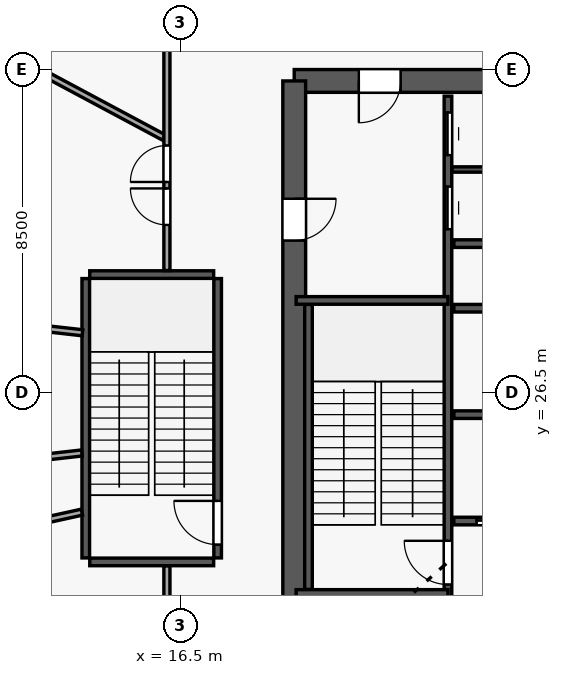
"""IFC4 building model, lengths in metres.
Left out: names, types, materials, properties, quantities, classifications, styles, units other than length and angle.
Written with IfcOpenShell. Run it as: python <this file> out.ifc"""

import sys

from ifc_helpers import new_model, si_unit, direction, frame, frame_2d, origin, origin_with_axes, origin_2d, place, context, subcontext, project, spatial, rectangle, circle, extrude, source, transform, mapped, element, fill, save


model = new_model("IFC4")
c1 = context("Model", 3, precision=1e-05, world=origin(), true_north=direction((0.0, 1.0)))
c2 = subcontext(c1, "Body", "Model", "MODEL_VIEW")
j1 = project(units=[si_unit("LENGTHUNIT", "METRE"), si_unit("PLANEANGLEUNIT", "RADIAN")], contexts=[c1])
p1 = place(None, origin())
s1 = spatial("IfcSite", under=j1, at=p1, CompositionType="ELEMENT")
p2 = place(p1, origin())
s2 = spatial("IfcBuilding", under=s1, at=p2, CompositionType="ELEMENT")
p3 = place(p2, frame((0.0, 0.0, 9.0)))
s3 = spatial("IfcBuildingStorey", under=s2, at=p3, CompositionType="ELEMENT", Elevation=9.0)
p4 = place(p3, frame((26.55, 34.7, 0.0), z_axis=(0.0, 0.0, 1.0), x_axis=(-1.0, 0.0, 0.0)))
e1 = element("IfcWall", 1, at=p4, inside=s3, PredefinedType="SHEAR", context=c2, shape_type="SweptSolid", body=[
    extrude(rectangle(XDim=7.05, YDim=0.6, at=frame_2d((3.525, 0.0))), origin(), (0.0, 0.0, 1.0), 4.2),
])
p5 = place(p4, frame((4.25, 0.0, 0.0)))
e2 = element("IfcOpeningElement", 2, at=p5, cuts=e1, PredefinedType="OPENING", context=c2, shape_type="SweptSolid", body=[
    extrude(rectangle(XDim=1.1, YDim=2.15, at=frame_2d((0.55, 1.075))), frame((0.0, 0.31, 0.0), z_axis=(0.0, -1.0, 0.0), x_axis=(1.0, 0.0, 0.0)), (0.0, 0.0, 1.0), 0.62),
])
p6 = place(p3, frame((19.5, 34.7, 0.0), z_axis=(0.0, 0.0, 1.0), x_axis=(0.0, -1.0, 0.0)))
e3 = element("IfcWall", 3, at=p6, inside=s3, PredefinedType="SHEAR", context=c2, shape_type="SweptSolid", body=[
    extrude(rectangle(XDim=16.4, YDim=0.6, at=frame_2d((8.2, 0.0))), origin(), (0.0, 0.0, 1.0), 4.2),
])
p7 = place(p6, frame((3.1, 0.0, 0.0)))
e4 = element("IfcOpeningElement", 4, at=p7, cuts=e3, PredefinedType="OPENING", context=c2, shape_type="SweptSolid", body=[
    extrude(rectangle(XDim=1.1, YDim=2.15, at=frame_2d((0.55, 1.075))), frame((0.0, 0.31, 0.0), z_axis=(0.0, -1.0, 0.0), x_axis=(1.0, 0.0, 0.0)), (0.0, 0.0, 1.0), 0.62),
])
m1 = source(origin_with_axes(), c2, "Body", "SweptSolid", [
    extrude(circle(Radius=0.9, at=origin_2d()), origin(), (0.0, 0.0, 1.0), 4.5),
])
p8 = place(p3, frame((19.5, 34.7, 0.0), z_axis=(0.0, 0.0, 1.0), x_axis=(1.0, 0.0, 0.0)))
e5 = element("IfcColumn", 5, at=p8, inside=s3, PredefinedType="COLUMN", context=c2, shape_type="MappedRepresentation", body=[
    mapped(m1, transform((0.0, 0.0, 0.0), scale=1.0)),
])
m2 = source(origin_with_axes(), c2, "Body", "SweptSolid", [
    extrude(rectangle(XDim=1.2, YDim=1.2, at=origin_2d()), origin(), (0.0, 0.0, 1.0), 4.5),
])
p9 = place(p3, frame((23.55, 29.0, 0.0), z_axis=(0.0, 0.0, 1.0), x_axis=(1.0, 0.0, 0.0)))
e6 = element("IfcColumn", 6, at=p9, inside=s3, PredefinedType="COLUMN", context=c2, shape_type="MappedRepresentation", body=[
    mapped(m2, transform((0.0, 0.0, 0.0), scale=1.0)),
])
p10 = place(p3, frame((23.545, 18.7, 0.0), z_axis=(0.0, 0.0, 1.0), x_axis=(0.0, 1.0, 0.0)))
e7 = element("IfcWall", 7, at=p10, inside=s3, PredefinedType="SHEAR", context=c2, shape_type="SweptSolid", body=[
    extrude(rectangle(XDim=15.6, YDim=0.2, at=frame_2d((7.8, 0.0))), origin(), (0.0, 0.0, 1.0), 4.2),
])
p11 = place(p10, frame((2.75, 0.0, 0.0)))
e8 = element("IfcOpeningElement", 8, at=p11, cuts=e7, PredefinedType="OPENING", context=c2, shape_type="SweptSolid", body=[
    extrude(rectangle(XDim=1.15, YDim=2.15, at=frame_2d((0.575, 1.075))), frame((0.0, 0.11, 0.0), z_axis=(0.0, -1.0, 0.0), x_axis=(1.0, 0.0, 0.0)), (0.0, 0.0, 1.0), 0.22),
])
p12 = place(p10, frame((0.14, 0.0, 0.0)))
e9 = element("IfcOpeningElement", 9, at=p12, cuts=e7, PredefinedType="OPENING", context=c2, shape_type="SweptSolid", body=[
    extrude(rectangle(XDim=0.88, YDim=2.1, at=frame_2d((0.44, 1.05))), frame((0.0, 0.11, 0.0), z_axis=(0.0, -1.0, 0.0), x_axis=(1.0, 0.0, 0.0)), (0.0, 0.0, 1.0), 0.22),
])
p13 = place(p10, frame((1.36, 0.0, 0.0)))
e10 = element("IfcOpeningElement", 10, at=p13, cuts=e7, PredefinedType="OPENING", context=c2, shape_type="SweptSolid", body=[
    extrude(rectangle(XDim=0.88, YDim=2.1, at=frame_2d((0.44, 1.05))), frame((0.0, 0.11, 0.0), z_axis=(0.0, -1.0, 0.0), x_axis=(1.0, 0.0, 0.0)), (0.0, 0.0, 1.0), 0.22),
])
p14 = place(p10, frame((12.1, 0.0, 0.0)))
e11 = element("IfcOpeningElement", 11, at=p14, cuts=e7, PredefinedType="OPENING", context=c2, shape_type="SweptSolid", body=[
    extrude(rectangle(XDim=1.12, YDim=2.15, at=frame_2d((0.56, 1.075))), frame((0.0, 0.11, 0.0), z_axis=(0.0, -1.0, 0.0), x_axis=(1.0, 0.0, 0.0)), (0.0, 0.0, 1.0), 0.22),
])
p15 = place(p10, frame((14.05, 0.0, 0.0)))
e12 = element("IfcOpeningElement", 12, at=p15, cuts=e7, PredefinedType="OPENING", context=c2, shape_type="SweptSolid", body=[
    extrude(rectangle(XDim=1.12, YDim=2.15, at=frame_2d((0.56, 1.075))), frame((0.0, 0.11, 0.0), z_axis=(0.0, -1.0, 0.0), x_axis=(1.0, 0.0, 0.0)), (0.0, 0.0, 1.0), 0.22),
])
p16 = place(p3, frame((23.7, 23.12, 0.0), z_axis=(0.0, 0.0, 1.0), x_axis=(1.0, 0.0, 0.0)))
e13 = element("IfcWall", 13, at=p16, inside=s3, PredefinedType="SHEAR", context=c2, shape_type="SweptSolid", body=[
    extrude(rectangle(XDim=9.6, YDim=0.2, at=frame_2d((4.8, 0.0))), origin(), (0.0, 0.0, 1.0), 4.2),
])
p17 = place(p16, frame((0.6, 0.0, 0.0)))
e14 = element("IfcOpeningElement", 14, at=p17, cuts=e13, PredefinedType="OPENING", context=c2, shape_type="SweptSolid", body=[
    extrude(rectangle(XDim=1.1, YDim=2.15, at=frame_2d((0.55, 1.075))), frame((0.0, 0.11, 0.0), z_axis=(0.0, -1.0, 0.0), x_axis=(1.0, 0.0, 0.0)), (0.0, 0.0, 1.0), 0.22),
])
p18 = place(p16, frame((2.98, 0.0, 0.0)))
e15 = element("IfcOpeningElement", 15, at=p18, cuts=e13, PredefinedType="OPENING", context=c2, shape_type="SweptSolid", body=[
    extrude(rectangle(XDim=1.1, YDim=2.15, at=frame_2d((0.55, 1.075))), frame((0.0, 0.11, 0.0), z_axis=(0.0, -1.0, 0.0), x_axis=(1.0, 0.0, 0.0)), (0.0, 0.0, 1.0), 0.22),
])
p19 = place(p16, frame((5.36, 0.0, 0.0)))
e16 = element("IfcOpeningElement", 16, at=p19, cuts=e13, PredefinedType="OPENING", context=c2, shape_type="SweptSolid", body=[
    extrude(rectangle(XDim=1.1, YDim=2.15, at=frame_2d((0.55, 1.075))), frame((0.0, 0.11, 0.0), z_axis=(0.0, -1.0, 0.0), x_axis=(1.0, 0.0, 0.0)), (0.0, 0.0, 1.0), 0.22),
])
p20 = place(p16, frame((7.74, 0.0, 0.0)))
e17 = element("IfcOpeningElement", 17, at=p20, cuts=e13, PredefinedType="OPENING", context=c2, shape_type="SweptSolid", body=[
    extrude(rectangle(XDim=1.1, YDim=2.15, at=frame_2d((0.55, 1.075))), frame((0.0, 0.11, 0.0), z_axis=(0.0, -1.0, 0.0), x_axis=(1.0, 0.0, 0.0)), (0.0, 0.0, 1.0), 0.22),
])
for number, where, z_axis, x_axis in (
    (18, (23.7, 25.92, 0.0), (0.0, 0.0, 1.0), (1.0, 0.0, 0.0)),
    (19, (23.7, 28.72, 0.0), (0.0, 0.0, 1.0), (1.0, 0.0, 0.0)),
):
    element("IfcWall", number, at=place(p3, frame(where, z_axis=z_axis, x_axis=x_axis)), inside=s3, PredefinedType="SHEAR", context=c2, shape_type="SweptSolid", body=[
        extrude(rectangle(XDim=9.6, YDim=0.2, at=frame_2d((4.8, 0.0))), origin(), (0.0, 0.0, 1.0), 4.2),
    ])
p21 = place(p3, frame((19.875, 21.32, 0.0), z_axis=(0.0, 0.0, 1.0), x_axis=(0.0, 1.0, 0.0)))
e20 = element("IfcWall", 20, at=p21, inside=s3, PredefinedType="SHEAR", context=c2, shape_type="SweptSolid", body=[
    extrude(rectangle(XDim=7.5, YDim=0.2, at=frame_2d((3.75, 0.0))), origin(), (0.0, 0.0, 1.0), 4.2),
])
p22 = place(p3, frame((14.015, 22.15, 0.0), z_axis=(0.0, 0.0, 1.0), x_axis=(0.0, 1.0, 0.0)))
e21 = element("IfcWall", 21, at=p22, inside=s3, PredefinedType="SHEAR", context=c2, shape_type="SweptSolid", body=[
    extrude(rectangle(XDim=7.35, YDim=0.2, at=frame_2d((3.675, 0.0))), origin(), (0.0, 0.0, 1.0), 4.2),
])
p23 = place(p3, frame((17.485, 22.15, 0.0), z_axis=(0.0, 0.0, 1.0), x_axis=(0.0, 1.0, 0.0)))
e22 = element("IfcWall", 22, at=p23, inside=s3, PredefinedType="SHEAR", context=c2, shape_type="SweptSolid", body=[
    extrude(rectangle(XDim=7.35, YDim=0.2, at=frame_2d((3.675, 0.0))), origin(), (0.0, 0.0, 1.0), 4.2),
])
p24 = place(p23, frame((0.35, 0.0, 0.0)))
e23 = element("IfcOpeningElement", 23, at=p24, cuts=e22, PredefinedType="OPENING", context=c2, shape_type="SweptSolid", body=[
    extrude(rectangle(XDim=1.15, YDim=2.15, at=frame_2d((0.575, 1.075))), frame((0.0, 0.11, 0.0), z_axis=(0.0, -1.0, 0.0), x_axis=(1.0, 0.0, 0.0)), (0.0, 0.0, 1.0), 0.22),
])
for number, where, z_axis, x_axis in (
    (24, (19.55, 21.215, 0.0), (0.0, 0.0, 1.0), (1.0, 0.0, 0.0)),
    (25, (19.55, 28.925, 0.0), (0.0, 0.0, 1.0), (1.0, 0.0, 0.0)),
):
    element("IfcWall", number, at=place(p3, frame(where, z_axis=z_axis, x_axis=x_axis)), inside=s3, PredefinedType="SHEAR", context=c2, shape_type="SweptSolid", body=[
        extrude(rectangle(XDim=3.995, YDim=0.2, at=frame_2d((1.998, 0.0))), origin(), (0.0, 0.0, 1.0), 4.2),
    ])
for number, where, z_axis, x_axis in (
    (26, (14.12, 22.045, 0.0), (0.0, 0.0, 1.0), (1.0, 0.0, 0.0)),
    (27, (14.12, 29.605, 0.0), (0.0, 0.0, 1.0), (1.0, 0.0, 0.0)),
):
    element("IfcWall", number, at=place(p3, frame(where, z_axis=z_axis, x_axis=x_axis)), inside=s3, PredefinedType="SHEAR", context=c2, shape_type="SweptSolid", body=[
        extrude(rectangle(XDim=3.26, YDim=0.2, at=frame_2d((1.63, 0.0))), origin(), (0.0, 0.0, 1.0), 4.2),
    ])
p25 = place(p3, frame((23.7, 30.42, 0.0), z_axis=(0.0, 0.0, 1.0), x_axis=(1.0, 0.0, 0.0)))
e28 = element("IfcWall", 28, at=p25, inside=s3, PredefinedType="SHEAR", context=c2, shape_type="SweptSolid", body=[
    extrude(rectangle(XDim=2.78, YDim=0.2, at=frame_2d((1.39, 0.0))), origin(), (0.0, 0.0, 1.0), 4.2),
])
p26 = place(p3, frame((16.068, 33.214, 0.0), z_axis=(0.0, 0.0, 1.0), x_axis=(-0.881886972295, 0.471460887132, 0.0)))
e29 = element("IfcWall", 29, at=p26, inside=s3, PredefinedType="PARTITIONING", context=c2, shape_type="SweptSolid", body=[
    extrude(rectangle(XDim=13.704, YDim=0.16, at=frame_2d((6.852, 0.0))), origin(), (0.0, 0.0, 1.0), 4.2),
])
p27 = place(p26, frame((6.422, 0.0, 0.0)))
e30 = element("IfcOpeningElement", 30, at=p27, cuts=e29, PredefinedType="OPENING", context=c2, shape_type="SweptSolid", body=[
    extrude(rectangle(XDim=0.86, YDim=2.04, at=frame_2d((0.43, 1.02))), frame((0.0, 0.09, 0.0), z_axis=(0.0, -1.0, 0.0), x_axis=(1.0, 0.0, 0.0)), (0.0, 0.0, 1.0), 0.18),
])
p28 = place(p3, frame((13.913, 23.354, 0.0), z_axis=(0.0, 0.0, 1.0), x_axis=(-0.976669637868, -0.214747336346, 0.0)))
e31 = element("IfcWall", 31, at=p28, inside=s3, PredefinedType="PARTITIONING", context=c2, shape_type="SweptSolid", body=[
    extrude(rectangle(XDim=10.174, YDim=0.16, at=frame_2d((5.087, 0.0))), origin(), (0.0, 0.0, 1.0), 4.2),
])
p29 = place(p28, frame((4.594, 0.0, 0.0)))
e32 = element("IfcOpeningElement", 32, at=p29, cuts=e31, PredefinedType="OPENING", context=c2, shape_type="SweptSolid", body=[
    extrude(rectangle(XDim=0.96, YDim=2.15, at=frame_2d((0.48, 1.075))), frame((0.0, 0.09, 0.0), z_axis=(0.0, -1.0, 0.0), x_axis=(1.0, 0.0, 0.0)), (0.0, 0.0, 1.0), 0.18),
])
p30 = place(p3, frame((13.913, 24.912, 0.0), z_axis=(0.0, 0.0, 1.0), x_axis=(-0.993672362641, -0.112317566405, 0.0)))
e33 = element("IfcWall", 33, at=p30, inside=s3, PredefinedType="PARTITIONING", context=c2, shape_type="SweptSolid", body=[
    extrude(rectangle(XDim=10.001, YDim=0.16, at=frame_2d((5.0, 0.0))), origin(), (0.0, 0.0, 1.0), 4.2),
])
p31 = place(p30, frame((4.66, 0.0, 0.0)))
e34 = element("IfcOpeningElement", 34, at=p31, cuts=e33, PredefinedType="OPENING", context=c2, shape_type="SweptSolid", body=[
    extrude(rectangle(XDim=0.86, YDim=2.04, at=frame_2d((0.43, 1.02))), frame((0.0, 0.09, 0.0), z_axis=(0.0, -1.0, 0.0), x_axis=(1.0, 0.0, 0.0)), (0.0, 0.0, 1.0), 0.18),
])
p32 = place(p3, frame((3.975, 29.191, 0.0), z_axis=(0.0, 0.0, 1.0), x_axis=(0.993764244895, -0.111501684152, 0.0)))
e35 = element("IfcWall", 35, at=p32, inside=s3, PredefinedType="PARTITIONING", context=c2, shape_type="SweptSolid", body=[
    extrude(rectangle(XDim=10.015, YDim=0.16, at=frame_2d((5.008, 0.0))), origin(), (0.0, 0.0, 1.0), 4.2),
])
p33 = place(p32, frame((4.367, 0.0, 0.0)))
e36 = element("IfcOpeningElement", 36, at=p33, cuts=e35, PredefinedType="OPENING", context=c2, shape_type="SweptSolid", body=[
    extrude(rectangle(XDim=0.96, YDim=2.15, at=frame_2d((0.48, 1.075))), frame((0.0, 0.09, 0.0), z_axis=(0.0, -1.0, 0.0), x_axis=(1.0, 0.0, 0.0)), (0.0, 0.0, 1.0), 0.18),
])
p34 = place(p3, frame((16.15, 29.712, 0.0), z_axis=(0.0, 0.0, 1.0), x_axis=(0.0, 1.0, 0.0)))
e37 = element("IfcWall", 37, at=p34, inside=s3, PredefinedType="PARTITIONING", context=c2, shape_type="SweptSolid", body=[
    extrude(rectangle(XDim=5.861, YDim=0.16, at=frame_2d((2.93, 0.0))), origin(), (0.0, 0.0, 1.0), 4.2),
])
p35 = place(p34, frame((2.33, 0.0, 0.0)))
e38 = element("IfcOpeningElement", 38, at=p35, cuts=e37, PredefinedType="OPENING", context=c2, shape_type="SweptSolid", body=[
    extrude(rectangle(XDim=0.96, YDim=2.15, at=frame_2d((0.48, 1.075))), frame((0.0, 0.09, 0.0), z_axis=(0.0, -1.0, 0.0), x_axis=(1.0, 0.0, 0.0)), (0.0, 0.0, 1.0), 0.18),
])
p36 = place(p34, frame((1.2, 0.0, 0.0)))
e39 = element("IfcOpeningElement", 39, at=p36, cuts=e37, PredefinedType="OPENING", context=c2, shape_type="SweptSolid", body=[
    extrude(rectangle(XDim=0.96, YDim=2.15, at=frame_2d((0.48, 1.075))), frame((0.0, 0.09, 0.0), z_axis=(0.0, -1.0, 0.0), x_axis=(1.0, 0.0, 0.0)), (0.0, 0.0, 1.0), 0.18),
])
p37 = place(p3, frame((23.652, 32.37, 0.0), z_axis=(0.0, 0.0, 1.0), x_axis=(1.0, 0.0, 0.0)))
e40 = element("IfcWall", 40, at=p37, inside=s3, PredefinedType="PARTITIONING", context=c2, shape_type="SweptSolid", body=[
    extrude(rectangle(XDim=2.828, YDim=0.14, at=frame_2d((1.414, 0.0))), origin(), (0.0, 0.0, 1.0), 4.2),
])
p38 = place(p3, frame((16.15, 20.42, 0.0), z_axis=(0.0, 0.0, 1.0), x_axis=(0.0, 1.0, 0.0)))
e41 = element("IfcWall", 41, at=p38, inside=s3, PredefinedType="PARTITIONING", context=c2, shape_type="SweptSolid", body=[
    extrude(rectangle(XDim=1.518, YDim=0.16, at=frame_2d((0.759, 0.0))), origin(), (0.0, 0.0, 1.0), 4.2),
])
m3 = source(origin_with_axes(), c2, "Body", "SweptSolid", [
    extrude(rectangle(XDim=1.15, YDim=2.15, at=frame_2d((0.575, 1.075))), frame((0.0, 0.025, 0.0), z_axis=(0.0, -1.0, 0.0), x_axis=(1.0, 0.0, 0.0)), (0.0, 0.0, 1.0), 0.05),
])
p39 = place(p11, origin())
e42 = element("IfcDoor", 42, at=p39, inside=s3, OperationType="SINGLE_SWING_RIGHT", PredefinedType="DOOR", context=c2, shape_type="MappedRepresentation", body=[
    mapped(m3, transform((0.0, 0.0, 0.0), scale=1.0)),
])
fill(e8, e42)
m4 = source(origin_with_axes(), c2, "Body", "SweptSolid", [
    extrude(rectangle(XDim=1.1, YDim=2.15, at=frame_2d((0.55, 1.075))), frame((0.0, 0.025, 0.0), z_axis=(0.0, -1.0, 0.0), x_axis=(1.0, 0.0, 0.0)), (0.0, 0.0, 1.0), 0.05),
])
p40 = place(p5, origin())
e43 = element("IfcDoor", 43, at=p40, inside=s3, OperationType="SINGLE_SWING_RIGHT", PredefinedType="DOOR", context=c2, shape_type="MappedRepresentation", body=[
    mapped(m4, transform((0.0, 0.0, 0.0), scale=1.0)),
])
fill(e2, e43)
p41 = place(p7, origin())
e44 = element("IfcDoor", 44, at=p41, inside=s3, OperationType="SINGLE_SWING_LEFT", PredefinedType="DOOR", context=c2, shape_type="MappedRepresentation", body=[
    mapped(m4, transform((0.0, 0.0, 0.0), scale=1.0)),
])
fill(e4, e44)
p42 = place(p17, origin())
e45 = element("IfcDoor", 45, at=p42, inside=s3, OperationType="SLIDING_TO_LEFT", PredefinedType="DOOR", context=c2, shape_type="MappedRepresentation", body=[
    mapped(m4, transform((0.0, 0.0, 0.0), scale=1.0)),
])
fill(e14, e45)
m5 = source(origin_with_axes(), c2, "Body", "SweptSolid", [
    extrude(rectangle(XDim=1.12, YDim=2.15, at=frame_2d((0.56, 1.075))), frame((0.0, 0.025, 0.0), z_axis=(0.0, -1.0, 0.0), x_axis=(1.0, 0.0, 0.0)), (0.0, 0.0, 1.0), 0.05),
])
p43 = place(p14, origin())
e46 = element("IfcDoor", 46, at=p43, inside=s3, OperationType="SLIDING_TO_LEFT", PredefinedType="DOOR", context=c2, shape_type="MappedRepresentation", body=[
    mapped(m5, transform((0.0, 0.0, 0.0), scale=1.0)),
])
fill(e11, e46)
p44 = place(p15, origin())
e47 = element("IfcDoor", 47, at=p44, inside=s3, OperationType="SLIDING_TO_RIGHT", PredefinedType="DOOR", context=c2, shape_type="MappedRepresentation", body=[
    mapped(m5, transform((0.0, 0.0, 0.0), scale=1.0)),
])
fill(e12, e47)
p45 = place(p24, origin())
e48 = element("IfcDoor", 48, at=p45, inside=s3, OperationType="SINGLE_SWING_RIGHT", PredefinedType="DOOR", context=c2, shape_type="MappedRepresentation", body=[
    mapped(m3, transform((0.0, 0.0, 0.0), scale=1.0)),
])
fill(e23, e48)
m6 = source(origin_with_axes(), c2, "Body", "SweptSolid", [
    extrude(rectangle(XDim=0.96, YDim=2.15, at=frame_2d((0.48, 1.075))), frame((0.0, 0.025, 0.0), z_axis=(0.0, -1.0, 0.0), x_axis=(1.0, 0.0, 0.0)), (0.0, 0.0, 1.0), 0.05),
])
p46 = place(p35, origin())
e49 = element("IfcDoor", 49, at=p46, inside=s3, OperationType="SINGLE_SWING_LEFT", PredefinedType="DOOR", context=c2, shape_type="MappedRepresentation", body=[
    mapped(m6, transform((0.0, 0.0, 0.0), scale=1.0)),
])
fill(e38, e49)
p47 = place(p36, origin())
e50 = element("IfcDoor", 50, at=p47, inside=s3, OperationType="SINGLE_SWING_RIGHT", PredefinedType="DOOR", context=c2, shape_type="MappedRepresentation", body=[
    mapped(m6, transform((0.0, 0.0, 0.0), scale=1.0)),
])
fill(e39, e50)
save(model, sys.argv[1])
